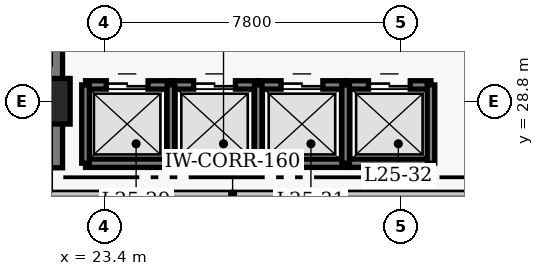
"""IFC4 building model, lengths in metres.
Left out: names, types, materials, properties, quantities, classifications, styles, units other than length and angle.
Written with IfcOpenShell. Run it as: python <this file> out.ifc"""

import sys

from ifc_helpers import new_model, si_unit, direction, frame, frame_2d, origin, origin_2d, place, context, subcontext, project, spatial, rectangle, extrude, element, fill, save


model = new_model("IFC4")
c1 = context("Model", 3, precision=1e-05, world=origin(), true_north=direction((0.0, 1.0)))
c2 = subcontext(c1, "Body", "Model", "MODEL_VIEW")
j1 = project(units=[si_unit("LENGTHUNIT", "METRE"), si_unit("PLANEANGLEUNIT", "RADIAN")], contexts=[c1])
p1 = place(None, origin())
s1 = spatial("IfcSite", under=j1, at=p1, CompositionType="ELEMENT")
p2 = place(p1, origin())
s2 = spatial("IfcBuilding", under=s1, at=p2, CompositionType="ELEMENT")
p3 = place(p2, frame((0.0, 0.0, 103.2)))
s3 = spatial("IfcBuildingStorey", under=s2, at=p3, CompositionType="ELEMENT", Elevation=103.2)
p4 = place(p3, frame((21.9, 27.05, 0.0), z_axis=(0.0, 0.0, 1.0), x_axis=(0.0, 1.0, 0.0)))
e1 = element("IfcWall", 1, at=p4, inside=s3, PredefinedType="SHEAR", context=c2, shape_type="SweptSolid", body=[
    extrude(rectangle(XDim=13.67, YDim=0.8, at=frame_2d((6.835, 0.0))), origin(), (0.0, 0.0, 1.0), 3.8),
])
p5 = place(p3, frame((21.9, 28.8, 0.0), z_axis=(0.0, 0.0, 1.0), x_axis=(1.0, 0.0, 0.0)))
e2 = element("IfcColumn", 2, at=p5, inside=s3, PredefinedType="COLUMN", context=c2, shape_type="SweptSolid", body=[
    extrude(rectangle(XDim=1.2, YDim=1.2, at=origin_2d()), origin(), (0.0, 0.0, 1.0), 3.8),
])
p6 = place(p3, frame((22.905, 29.23, 0.0), z_axis=(0.0, 0.0, 1.0), x_axis=(1.0, 0.0, 0.0)))
e3 = element("IfcWall", 3, at=p6, inside=s3, PredefinedType="SHEAR", context=c2, shape_type="SweptSolid", body=[
    extrude(rectangle(XDim=2.245, YDim=0.22, at=frame_2d((1.123, 0.0))), origin(), (0.0, 0.0, 1.0), 3.8),
])
p7 = place(p6, frame((0.545, 0.0, 0.0)))
e4 = element("IfcOpeningElement", 4, at=p7, cuts=e3, PredefinedType="OPENING", context=c2, shape_type="SweptSolid", body=[
    extrude(rectangle(XDim=1.1, YDim=2.15, at=frame_2d((0.55, 1.075))), frame((0.0, 0.12, 0.0), z_axis=(0.0, -1.0, 0.0), x_axis=(1.0, 0.0, 0.0)), (0.0, 0.0, 1.0), 0.24),
])
p8 = place(p3, frame((22.905, 27.17, 0.0), z_axis=(0.0, 0.0, 1.0), x_axis=(1.0, 0.0, 0.0)))
e5 = element("IfcWall", 5, at=p8, inside=s3, PredefinedType="SHEAR", context=c2, shape_type="SweptSolid", body=[
    extrude(rectangle(XDim=2.245, YDim=0.22, at=frame_2d((1.123, 0.0))), origin(), (0.0, 0.0, 1.0), 3.8),
])
p9 = place(p3, frame((22.905, 27.17, 0.0), z_axis=(0.0, 0.0, 1.0), x_axis=(0.0, 1.0, 0.0)))
e6 = element("IfcWall", 6, at=p9, inside=s3, PredefinedType="SHEAR", context=c2, shape_type="SweptSolid", body=[
    extrude(rectangle(XDim=2.06, YDim=0.2, at=frame_2d((1.03, 0.0))), origin(), (0.0, 0.0, 1.0), 3.8),
])
p10 = place(p3, frame((25.15, 29.23, 0.0), z_axis=(0.0, 0.0, 1.0), x_axis=(1.0, 0.0, 0.0)))
e7 = element("IfcWall", 7, at=p10, inside=s3, PredefinedType="SHEAR", context=c2, shape_type="SweptSolid", body=[
    extrude(rectangle(XDim=2.3, YDim=0.22, at=frame_2d((1.15, 0.0))), origin(), (0.0, 0.0, 1.0), 3.8),
])
p11 = place(p10, frame((0.6, 0.0, 0.0)))
e8 = element("IfcOpeningElement", 8, at=p11, cuts=e7, PredefinedType="OPENING", context=c2, shape_type="SweptSolid", body=[
    extrude(rectangle(XDim=1.1, YDim=2.15, at=frame_2d((0.55, 1.075))), frame((0.0, 0.12, 0.0), z_axis=(0.0, -1.0, 0.0), x_axis=(1.0, 0.0, 0.0)), (0.0, 0.0, 1.0), 0.24),
])
p12 = place(p3, frame((25.15, 27.17, 0.0), z_axis=(0.0, 0.0, 1.0), x_axis=(1.0, 0.0, 0.0)))
e9 = element("IfcWall", 9, at=p12, inside=s3, PredefinedType="SHEAR", context=c2, shape_type="SweptSolid", body=[
    extrude(rectangle(XDim=2.3, YDim=0.22, at=frame_2d((1.15, 0.0))), origin(), (0.0, 0.0, 1.0), 3.8),
])
p13 = place(p3, frame((25.15, 27.17, 0.0), z_axis=(0.0, 0.0, 1.0), x_axis=(0.0, 1.0, 0.0)))
e10 = element("IfcWall", 10, at=p13, inside=s3, PredefinedType="SHEAR", context=c2, shape_type="SweptSolid", body=[
    extrude(rectangle(XDim=2.06, YDim=0.2, at=frame_2d((1.03, 0.0))), origin(), (0.0, 0.0, 1.0), 3.8),
])
p14 = place(p3, frame((27.45, 29.23, 0.0), z_axis=(0.0, 0.0, 1.0), x_axis=(1.0, 0.0, 0.0)))
e11 = element("IfcWall", 11, at=p14, inside=s3, PredefinedType="SHEAR", context=c2, shape_type="SweptSolid", body=[
    extrude(rectangle(XDim=2.3, YDim=0.22, at=frame_2d((1.15, 0.0))), origin(), (0.0, 0.0, 1.0), 3.8),
])
p15 = place(p14, frame((0.6, 0.0, 0.0)))
e12 = element("IfcOpeningElement", 12, at=p15, cuts=e11, PredefinedType="OPENING", context=c2, shape_type="SweptSolid", body=[
    extrude(rectangle(XDim=1.1, YDim=2.15, at=frame_2d((0.55, 1.075))), frame((0.0, 0.12, 0.0), z_axis=(0.0, -1.0, 0.0), x_axis=(1.0, 0.0, 0.0)), (0.0, 0.0, 1.0), 0.24),
])
p16 = place(p3, frame((27.45, 27.17, 0.0), z_axis=(0.0, 0.0, 1.0), x_axis=(1.0, 0.0, 0.0)))
e13 = element("IfcWall", 13, at=p16, inside=s3, PredefinedType="SHEAR", context=c2, shape_type="SweptSolid", body=[
    extrude(rectangle(XDim=2.3, YDim=0.22, at=frame_2d((1.15, 0.0))), origin(), (0.0, 0.0, 1.0), 3.8),
])
p17 = place(p3, frame((27.45, 27.17, 0.0), z_axis=(0.0, 0.0, 1.0), x_axis=(0.0, 1.0, 0.0)))
e14 = element("IfcWall", 14, at=p17, inside=s3, PredefinedType="SHEAR", context=c2, shape_type="SweptSolid", body=[
    extrude(rectangle(XDim=2.06, YDim=0.2, at=frame_2d((1.03, 0.0))), origin(), (0.0, 0.0, 1.0), 3.8),
])
p18 = place(p3, frame((29.75, 29.23, 0.0), z_axis=(0.0, 0.0, 1.0), x_axis=(1.0, 0.0, 0.0)))
e15 = element("IfcWall", 15, at=p18, inside=s3, PredefinedType="SHEAR", context=c2, shape_type="SweptSolid", body=[
    extrude(rectangle(XDim=2.245, YDim=0.22, at=frame_2d((1.123, 0.0))), origin(), (0.0, 0.0, 1.0), 3.8),
])
p19 = place(p18, frame((0.6, 0.0, 0.0)))
e16 = element("IfcOpeningElement", 16, at=p19, cuts=e15, PredefinedType="OPENING", context=c2, shape_type="SweptSolid", body=[
    extrude(rectangle(XDim=1.1, YDim=2.15, at=frame_2d((0.55, 1.075))), frame((0.0, 0.12, 0.0), z_axis=(0.0, -1.0, 0.0), x_axis=(1.0, 0.0, 0.0)), (0.0, 0.0, 1.0), 0.24),
])
p20 = place(p3, frame((29.75, 27.17, 0.0), z_axis=(0.0, 0.0, 1.0), x_axis=(1.0, 0.0, 0.0)))
e17 = element("IfcWall", 17, at=p20, inside=s3, PredefinedType="SHEAR", context=c2, shape_type="SweptSolid", body=[
    extrude(rectangle(XDim=2.245, YDim=0.22, at=frame_2d((1.123, 0.0))), origin(), (0.0, 0.0, 1.0), 3.8),
])
for number, where, z_axis, x_axis in (
    (18, (29.75, 27.17, 0.0), (0.0, 0.0, 1.0), (0.0, 1.0, 0.0)),
    (19, (31.995, 27.17, 0.0), (0.0, 0.0, 1.0), (0.0, 1.0, 0.0)),
):
    element("IfcWall", number, at=place(p3, frame(where, z_axis=z_axis, x_axis=x_axis)), inside=s3, PredefinedType="SHEAR", context=c2, shape_type="SweptSolid", body=[
        extrude(rectangle(XDim=2.06, YDim=0.2, at=frame_2d((1.03, 0.0))), origin(), (0.0, 0.0, 1.0), 3.8),
    ])
p21 = place(p3, frame((19.9, 26.36, 0.0), z_axis=(0.0, 0.0, 1.0), x_axis=(1.0, 0.0, 0.0)))
e20 = element("IfcWall", 20, at=p21, inside=s3, PredefinedType="PARTITIONING", context=c2, shape_type="SweptSolid", body=[
    extrude(rectangle(XDim=13.75, YDim=0.16, at=frame_2d((6.875, 0.0))), origin(), (0.0, 0.0, 1.0), 3.54),
])
p22 = place(p7, origin())
e21 = element("IfcDoor", 21, at=p22, inside=s3, OperationType="DOUBLE_DOOR_SLIDING", PredefinedType="DOOR", context=c2, shape_type="SweptSolid", body=[
    extrude(rectangle(XDim=1.1, YDim=2.15, at=frame_2d((0.55, 1.075))), frame((0.0, 0.025, 0.0), z_axis=(0.0, -1.0, 0.0), x_axis=(1.0, 0.0, 0.0)), (0.0, 0.0, 1.0), 0.05),
])
fill(e4, e21)
p23 = place(p11, origin())
e22 = element("IfcDoor", 22, at=p23, inside=s3, OperationType="DOUBLE_DOOR_SLIDING", PredefinedType="DOOR", context=c2, shape_type="SweptSolid", body=[
    extrude(rectangle(XDim=1.1, YDim=2.15, at=frame_2d((0.55, 1.075))), frame((0.0, 0.025, 0.0), z_axis=(0.0, -1.0, 0.0), x_axis=(1.0, 0.0, 0.0)), (0.0, 0.0, 1.0), 0.05),
])
fill(e8, e22)
p24 = place(p15, origin())
e23 = element("IfcDoor", 23, at=p24, inside=s3, OperationType="DOUBLE_DOOR_SLIDING", PredefinedType="DOOR", context=c2, shape_type="SweptSolid", body=[
    extrude(rectangle(XDim=1.1, YDim=2.15, at=frame_2d((0.55, 1.075))), frame((0.0, 0.025, 0.0), z_axis=(0.0, -1.0, 0.0), x_axis=(1.0, 0.0, 0.0)), (0.0, 0.0, 1.0), 0.05),
])
fill(e12, e23)
p25 = place(p19, origin())
e24 = element("IfcDoor", 24, at=p25, inside=s3, OperationType="DOUBLE_DOOR_SLIDING", PredefinedType="DOOR", context=c2, shape_type="SweptSolid", body=[
    extrude(rectangle(XDim=1.1, YDim=2.15, at=frame_2d((0.55, 1.075))), frame((0.0, 0.025, 0.0), z_axis=(0.0, -1.0, 0.0), x_axis=(1.0, 0.0, 0.0)), (0.0, 0.0, 1.0), 0.05),
])
fill(e16, e24)
save(model, sys.argv[1])
